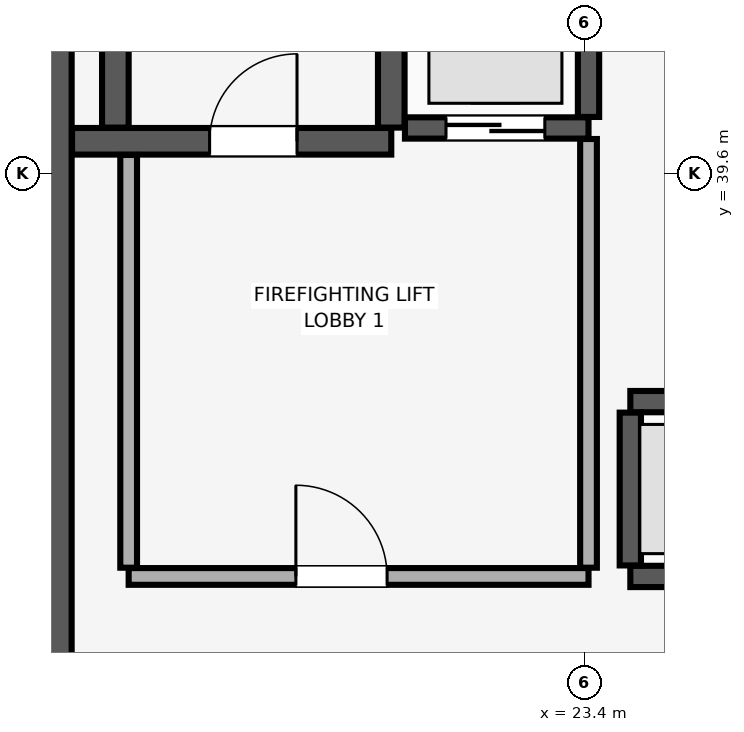
"""IFC4 building model, lengths in metres.
Left out: names, types, materials, properties, quantities, classifications, styles, units other than length and angle.
Written with IfcOpenShell. Run it as: python <this file> out.ifc"""

import sys

from ifc_helpers import new_model, si_unit, direction, frame, frame_2d, origin, place, context, subcontext, project, spatial, rectangle, extrude, element, fill, save


model = new_model("IFC4")
c1 = context("Model", 3, precision=1e-05, world=origin(), true_north=direction((0.0, 1.0)))
c2 = subcontext(c1, "Body", "Model", "MODEL_VIEW")
j1 = project(units=[si_unit("LENGTHUNIT", "METRE"), si_unit("PLANEANGLEUNIT", "RADIAN")], contexts=[c1])
p1 = place(None, origin())
s1 = spatial("IfcSite", under=j1, at=p1, CompositionType="ELEMENT")
p2 = place(p1, origin())
s2 = spatial("IfcBuilding", under=s1, at=p2, CompositionType="ELEMENT")
p3 = place(p2, frame((0.0, 0.0, 104.3)))
s3 = spatial("IfcBuildingStorey", under=s2, at=p3, CompositionType="ELEMENT", Elevation=104.3)
p4 = place(p3, frame((16.2, 29.4, 0.0), z_axis=(0.0, 0.0, 1.0), x_axis=(0.0, 1.0, 0.0)))
e1 = element("IfcWall", 1, at=p4, inside=s3, PredefinedType="SHEAR", context=c2, shape_type="SweptSolid", body=[
    extrude(rectangle(XDim=19.2, YDim=0.9, at=frame_2d((9.6, 0.0))), origin(), (0.0, 0.0, 1.0), 3.51),
])
p5 = place(p3, frame((16.655, 40.025, 0.0), z_axis=(0.0, 0.0, 1.0), x_axis=(1.0, 0.0, 0.0)))
e2 = element("IfcWall", 2, at=p5, inside=s3, PredefinedType="SHEAR", context=c2, shape_type="SweptSolid", body=[
    extrude(rectangle(XDim=4.2, YDim=0.35, at=frame_2d((2.1, 0.0))), origin(), (0.0, 0.0, 1.0), 3.51),
])
p6 = place(p5, frame((1.81, 0.0, 0.0)))
e3 = element("IfcOpeningElement", 3, at=p6, cuts=e2, PredefinedType="OPENING", context=c2, shape_type="SweptSolid", body=[
    extrude(rectangle(XDim=1.15, YDim=2.15, at=frame_2d((0.575, 1.075))), frame((0.0, 0.185, 0.0), z_axis=(0.0, -1.0, 0.0), x_axis=(1.0, 0.0, 0.0)), (0.0, 0.0, 1.0), 0.37),
])
for number, where, z_axis, x_axis in (
    (4, (17.225, 40.205, 0.0), (0.0, 0.0, 1.0), (0.0, 1.0, 0.0)),
    (5, (20.855, 40.205, 0.0), (0.0, 0.0, 1.0), (0.0, 1.0, 0.0)),
):
    element("IfcWall", number, at=place(p3, frame(where, z_axis=z_axis, x_axis=x_axis)), inside=s3, PredefinedType="SHEAR", context=c2, shape_type="SweptSolid", body=[
        extrude(rectangle(XDim=8.09, YDim=0.35, at=frame_2d((4.045, 0.0))), origin(), (0.0, 0.0, 1.0), 3.51),
    ])
p7 = place(p3, frame((24.0, 34.3, 0.0), z_axis=(0.0, 0.0, 1.0), x_axis=(1.0, 0.0, 0.0)))
e6 = element("IfcWall", 6, at=p7, inside=s3, PredefinedType="SHEAR", context=c2, shape_type="SweptSolid", body=[
    extrude(rectangle(XDim=2.3, YDim=0.28, at=frame_2d((1.15, 0.0))), origin(), (0.0, 0.0, 1.0), 3.51),
])
p8 = place(p7, frame((0.6, 0.0, 0.0)))
e7 = element("IfcOpeningElement", 7, at=p8, cuts=e6, PredefinedType="OPENING", context=c2, shape_type="SweptSolid", body=[
    extrude(rectangle(XDim=1.1, YDim=2.2, at=frame_2d((0.55, 1.1))), frame((0.0, 0.15, 0.0), z_axis=(0.0, -1.0, 0.0), x_axis=(1.0, 0.0, 0.0)), (0.0, 0.0, 1.0), 0.3),
])
p9 = place(p3, frame((24.0, 36.6, 0.0), z_axis=(0.0, 0.0, 1.0), x_axis=(1.0, 0.0, 0.0)))
e8 = element("IfcWall", 8, at=p9, inside=s3, PredefinedType="SHEAR", context=c2, shape_type="SweptSolid", body=[
    extrude(rectangle(XDim=2.3, YDim=0.28, at=frame_2d((1.15, 0.0))), origin(), (0.0, 0.0, 1.0), 3.51),
])
p10 = place(p3, frame((24.0, 34.445, 0.0), z_axis=(0.0, 0.0, 1.0), x_axis=(0.0, 1.0, 0.0)))
e9 = element("IfcWall", 9, at=p10, inside=s3, PredefinedType="SHEAR", context=c2, shape_type="SweptSolid", body=[
    extrude(rectangle(XDim=2.01, YDim=0.28, at=frame_2d((1.005, 0.0))), origin(), (0.0, 0.0, 1.0), 3.51),
])
p11 = place(p3, frame((21.035, 40.2, 0.0), z_axis=(0.0, 0.0, 1.0), x_axis=(1.0, 0.0, 0.0)))
e10 = element("IfcWall", 10, at=p11, inside=s3, PredefinedType="SHEAR", context=c2, shape_type="SweptSolid", body=[
    extrude(rectangle(XDim=2.415, YDim=0.28, at=frame_2d((1.208, 0.0))), origin(), (0.0, 0.0, 1.0), 3.51),
])
p12 = place(p11, frame((0.54, 0.0, 0.0)))
e11 = element("IfcOpeningElement", 11, at=p12, cuts=e10, PredefinedType="OPENING", context=c2, shape_type="SweptSolid", body=[
    extrude(rectangle(XDim=1.3, YDim=2.3, at=frame_2d((0.65, 1.15))), frame((0.0, 0.15, 0.0), z_axis=(0.0, -1.0, 0.0), x_axis=(1.0, 0.0, 0.0)), (0.0, 0.0, 1.0), 0.3),
])
p13 = place(p3, frame((23.45, 40.345, 0.0), z_axis=(0.0, 0.0, 1.0), x_axis=(0.0, 1.0, 0.0)))
e12 = element("IfcWall", 12, at=p13, inside=s3, PredefinedType="SHEAR", context=c2, shape_type="SweptSolid", body=[
    extrude(rectangle(XDim=2.81, YDim=0.28, at=frame_2d((1.405, 0.0))), origin(), (0.0, 0.0, 1.0), 3.51),
])
p14 = place(p3, frame((17.4, 34.3, 0.0), z_axis=(0.0, 0.0, 1.0), x_axis=(1.0, 0.0, 0.0)))
e13 = element("IfcWall", 13, at=p14, inside=s3, PredefinedType="PARTITIONING", context=c2, shape_type="SweptSolid", body=[
    extrude(rectangle(XDim=6.05, YDim=0.22, at=frame_2d((3.025, 0.0))), origin(), (0.0, 0.0, 1.0), 3.51),
])
p15 = place(p14, frame((2.2, 0.0, 0.0)))
e14 = element("IfcOpeningElement", 14, at=p15, cuts=e13, PredefinedType="OPENING", context=c2, shape_type="SweptSolid", body=[
    extrude(rectangle(XDim=1.2, YDim=2.15, at=frame_2d((0.6, 1.075))), frame((0.0, 0.12, 0.0), z_axis=(0.0, -1.0, 0.0), x_axis=(1.0, 0.0, 0.0)), (0.0, 0.0, 1.0), 0.24),
])
p16 = place(p3, frame((17.4, 34.415, 0.0), z_axis=(0.0, 0.0, 1.0), x_axis=(0.0, 1.0, 0.0)))
e15 = element("IfcWall", 15, at=p16, inside=s3, PredefinedType="PARTITIONING", context=c2, shape_type="SweptSolid", body=[
    extrude(rectangle(XDim=5.43, YDim=0.22, at=frame_2d((2.715, 0.0))), origin(), (0.0, 0.0, 1.0), 3.51),
])
p17 = place(p3, frame((23.45, 34.415, 0.0), z_axis=(0.0, 0.0, 1.0), x_axis=(0.0, 1.0, 0.0)))
e16 = element("IfcWall", 16, at=p17, inside=s3, PredefinedType="PARTITIONING", context=c2, shape_type="SweptSolid", body=[
    extrude(rectangle(XDim=5.64, YDim=0.22, at=frame_2d((2.82, 0.0))), origin(), (0.0, 0.0, 1.0), 3.51),
])
p18 = place(p6, origin())
e17 = element("IfcDoor", 17, at=p18, inside=s3, OperationType="SINGLE_SWING_RIGHT", PredefinedType="DOOR", context=c2, shape_type="SweptSolid", body=[
    extrude(rectangle(XDim=1.15, YDim=2.15, at=frame_2d((0.575, 1.075))), frame((0.0, 0.025, 0.0), z_axis=(0.0, -1.0, 0.0), x_axis=(1.0, 0.0, 0.0)), (0.0, 0.0, 1.0), 0.05),
])
fill(e3, e17)
p19 = place(p12, origin())
e18 = element("IfcDoor", 18, at=p19, inside=s3, OperationType="DOUBLE_DOOR_SLIDING", PredefinedType="DOOR", context=c2, shape_type="SweptSolid", body=[
    extrude(rectangle(XDim=1.3, YDim=2.3, at=frame_2d((0.65, 1.15))), frame((0.0, 0.025, 0.0), z_axis=(0.0, -1.0, 0.0), x_axis=(1.0, 0.0, 0.0)), (0.0, 0.0, 1.0), 0.05),
])
fill(e11, e18)
p20 = place(p15, origin())
e19 = element("IfcDoor", 19, at=p20, inside=s3, OperationType="SINGLE_SWING_LEFT", PredefinedType="DOOR", context=c2, shape_type="SweptSolid", body=[
    extrude(rectangle(XDim=1.2, YDim=2.15, at=frame_2d((0.6, 1.075))), frame((0.0, 0.025, 0.0), z_axis=(0.0, -1.0, 0.0), x_axis=(1.0, 0.0, 0.0)), (0.0, 0.0, 1.0), 0.05),
])
fill(e14, e19)
save(model, sys.argv[1])
